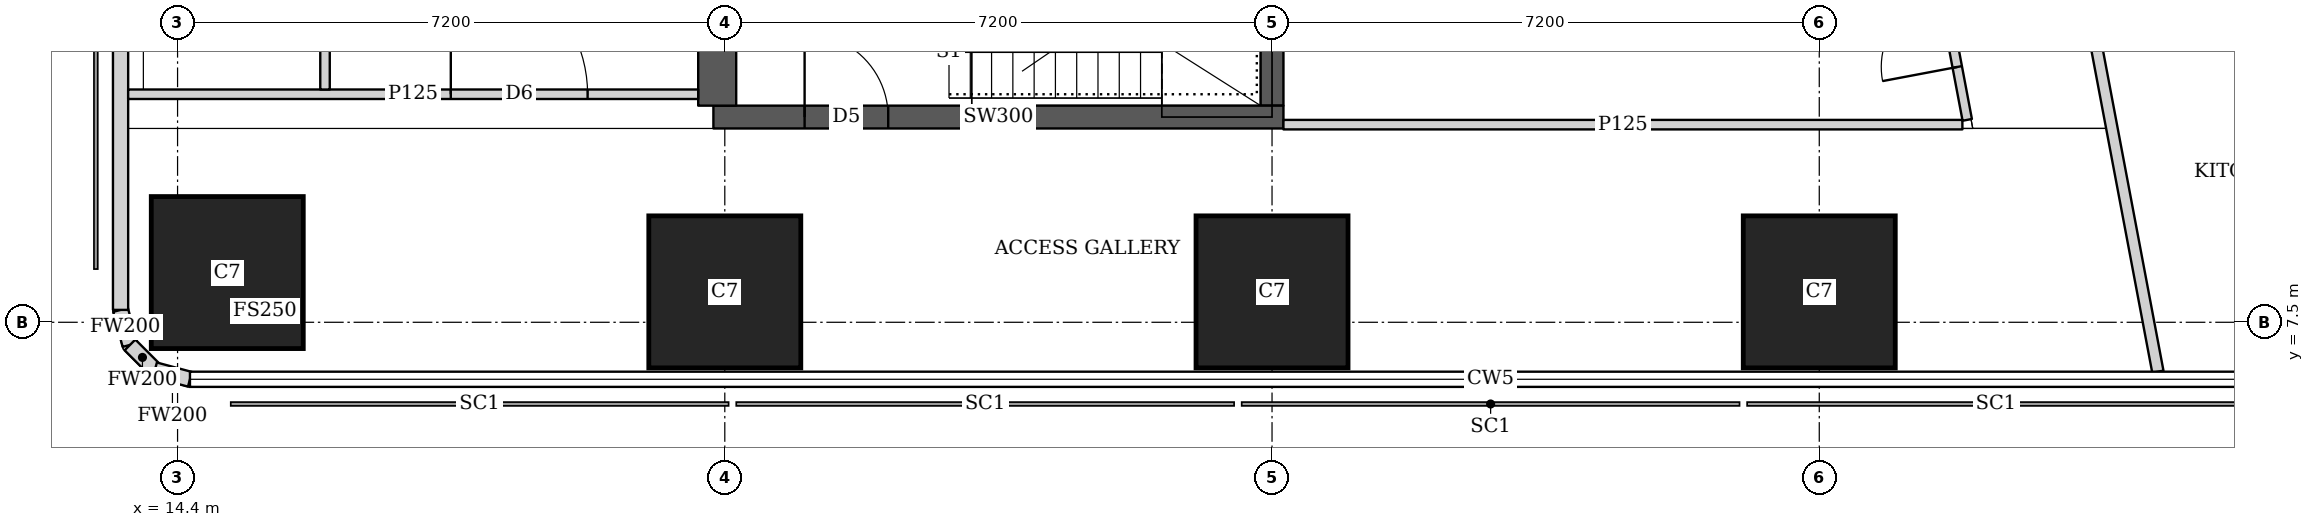
"""IFC4 building model, lengths in metres.
Left out: names, types, materials, properties, quantities, classifications, styles, units other than length and angle.
Written with IfcOpenShell. Run it as: python <this file> out.ifc"""

import sys

from ifc_helpers import new_model, si_unit, direction, frame, frame_2d, origin, origin_2d, place, context, subcontext, project, spatial, rectangle, extrude, element, fill, save


model = new_model("IFC4")
c1 = context("Model", 3, precision=1e-05, world=origin(), true_north=direction((0.0, 1.0)))
c2 = subcontext(c1, "Body", "Model", "MODEL_VIEW")
j1 = project(units=[si_unit("LENGTHUNIT", "METRE"), si_unit("PLANEANGLEUNIT", "RADIAN")], contexts=[c1])
p1 = place(None, origin())
s1 = spatial("IfcSite", under=j1, at=p1, CompositionType="ELEMENT")
p2 = place(p1, origin())
s2 = spatial("IfcBuilding", under=s1, at=p2, CompositionType="ELEMENT")
p3 = place(p2, frame((0.0, 0.0, 255.35)))
s3 = spatial("IfcBuildingStorey", under=s2, at=p3, CompositionType="ELEMENT", Elevation=255.35)
for number, where, z_axis, x_axis in (
    (1, (15.054, 8.154, 0.0), (0.0, 0.0, 1.0), (1.0, 0.0, 0.0)),
    (2, (21.6, 7.9, 0.0), (0.0, 0.0, 1.0), (1.0, 0.0, 0.0)),
    (3, (28.8, 7.9, 0.0), (0.0, 0.0, 1.0), (1.0, 0.0, 0.0)),
    (4, (36.0, 7.9, 0.0), (0.0, 0.0, 1.0), (1.0, 0.0, 0.0)),
):
    element("IfcColumn", number, at=place(p3, frame(where, z_axis=z_axis, x_axis=x_axis)), inside=s3, PredefinedType="COLUMN", context=c2, shape_type="SweptSolid", body=[
        extrude(rectangle(XDim=2.0, YDim=2.0, at=origin_2d()), origin(), (0.0, 0.0, 1.0), 3.75),
    ])
p4 = place(p3, frame((21.45, 10.2, 0.0), z_axis=(0.0, 0.0, 1.0), x_axis=(1.0, 0.0, 0.0)))
e5 = element("IfcWall", 5, at=p4, inside=s3, PredefinedType="SHEAR", context=c2, shape_type="SweptSolid", body=[
    extrude(rectangle(XDim=7.5, YDim=0.3, at=frame_2d((3.75, 0.0))), origin(), (0.0, 0.0, 1.0), 3.75),
])
p5 = place(p4, frame((1.2, 0.0, 0.0)))
e6 = element("IfcOpeningElement", 6, at=p5, cuts=e5, PredefinedType="OPENING", context=c2, shape_type="SweptSolid", body=[
    extrude(rectangle(XDim=1.1, YDim=2.1, at=frame_2d((0.55, 1.05))), frame((0.0, 0.16, 0.0), z_axis=(0.0, -1.0, 0.0), x_axis=(1.0, 0.0, 0.0)), (0.0, 0.0, 1.0), 0.32),
])
p6 = place(p3, frame((21.5, 10.35, 0.0), z_axis=(0.0, 0.0, 1.0), x_axis=(0.0, 1.0, 0.0)))
e7 = element("IfcWall", 7, at=p6, inside=s3, PredefinedType="SHEAR", context=c2, shape_type="SweptSolid", body=[
    extrude(rectangle(XDim=4.2, YDim=0.5, at=frame_2d((2.1, 0.0))), origin(), (0.0, 0.0, 1.0), 3.75),
])
p7 = place(p3, frame((28.8, 10.35, 0.0), z_axis=(0.0, 0.0, 1.0), x_axis=(0.0, 1.0, 0.0)))
e8 = element("IfcWall", 8, at=p7, inside=s3, PredefinedType="SHEAR", context=c2, shape_type="SweptSolid", body=[
    extrude(rectangle(XDim=4.2, YDim=0.3, at=frame_2d((2.1, 0.0))), origin(), (0.0, 0.0, 1.0), 3.75),
])
p8 = place(p3, frame((13.65, 43.037, 0.0), z_axis=(0.0, 0.0, 1.0), x_axis=(0.0, -1.0, 0.0)))
e9 = element("IfcWall", 9, at=p8, inside=s3, PredefinedType="SOLIDWALL", context=c2, shape_type="SweptSolid", body=[
    extrude(rectangle(XDim=35.374, YDim=0.2, at=frame_2d((17.687, 0.0))), origin(), (0.0, 0.0, 1.0), 3.5),
])
p9 = place(p8, frame((1.959, 0.0, 0.9)))
e10 = element("IfcOpeningElement", 10, at=p9, cuts=e9, PredefinedType="OPENING", context=c2, shape_type="SweptSolid", body=[
    extrude(rectangle(XDim=1.8, YDim=1.5, at=frame_2d((0.9, 0.75))), frame((0.0, 0.11, 0.0), z_axis=(0.0, -1.0, 0.0), x_axis=(1.0, 0.0, 0.0)), (0.0, 0.0, 1.0), 0.22),
])
p10 = place(p3, frame((13.65, 7.663, 0.0), z_axis=(0.0, 0.0, 1.0), x_axis=(0.259698463175, -0.965689757751, 0.0)))
e11 = element("IfcWall", 11, at=p10, inside=s3, PredefinedType="SOLIDWALL", context=c2, shape_type="SweptSolid", body=[
    extrude(rectangle(XDim=0.478, YDim=0.2, at=frame_2d((0.239, 0.0))), origin(), (0.0, 0.0, 1.0), 3.5),
])
p11 = place(p3, frame((13.774, 7.202, 0.0), z_axis=(0.0, 0.0, 1.0), x_axis=(0.707369890659, -0.706843573776, 0.0)))
e12 = element("IfcWall", 12, at=p11, inside=s3, PredefinedType="SOLIDWALL", context=c2, shape_type="SweptSolid", body=[
    extrude(rectangle(XDim=0.464, YDim=0.2, at=frame_2d((0.232, 0.0))), origin(), (0.0, 0.0, 1.0), 3.5),
])
p12 = place(p3, frame((14.102, 6.874, 0.0), z_axis=(0.0, 0.0, 1.0), x_axis=(0.965655254015, -0.259826731483, 0.0)))
e13 = element("IfcWall", 13, at=p12, inside=s3, PredefinedType="SOLIDWALL", context=c2, shape_type="SweptSolid", body=[
    extrude(rectangle(XDim=0.477, YDim=0.2, at=frame_2d((0.239, 0.0))), origin(), (0.0, 0.0, 1.0), 3.5),
])
p13 = place(p3, frame((33.781, 42.186, 0.0), z_axis=(0.0, 0.0, 1.0), x_axis=(0.185593518645, -0.9826266055, 0.0)))
e14 = element("IfcWall", 14, at=p13, inside=s3, PredefinedType="SOLIDWALL", context=c2, shape_type="SweptSolid", body=[
    extrude(rectangle(XDim=35.961, YDim=0.15, at=frame_2d((17.98, 0.0))), origin(), (0.0, 0.0, 1.0), 2.5),
])
p14 = place(p13, frame((7.183, 0.0, 0.0)))
e15 = element("IfcOpeningElement", 15, at=p14, cuts=e14, PredefinedType="OPENING", context=c2, shape_type="SweptSolid", body=[
    extrude(rectangle(XDim=1.0, YDim=2.1, at=frame_2d((0.5, 1.05))), frame((0.0, 0.085, 0.0), z_axis=(0.0, -1.0, 0.0), x_axis=(1.0, 0.0, 0.0)), (0.0, 0.0, 1.0), 0.17),
])
p15 = place(p13, frame((11.76, 0.0, 0.0)))
e16 = element("IfcOpeningElement", 16, at=p15, cuts=e14, PredefinedType="OPENING", context=c2, shape_type="SweptSolid", body=[
    extrude(rectangle(XDim=1.0, YDim=2.1, at=frame_2d((0.5, 1.05))), frame((0.0, 0.085, 0.0), z_axis=(0.0, -1.0, 0.0), x_axis=(1.0, 0.0, 0.0)), (0.0, 0.0, 1.0), 0.17),
])
p16 = place(p13, frame((23.863, 0.0, 0.0)))
e17 = element("IfcOpeningElement", 17, at=p16, cuts=e14, PredefinedType="OPENING", context=c2, shape_type="SweptSolid", body=[
    extrude(rectangle(XDim=1.0, YDim=2.1, at=frame_2d((0.5, 1.05))), frame((0.0, 0.085, 0.0), z_axis=(0.0, -1.0, 0.0), x_axis=(1.0, 0.0, 0.0)), (0.0, 0.0, 1.0), 0.17),
])
p17 = place(p13, frame((30.502, 0.0, 0.0)))
e18 = element("IfcOpeningElement", 18, at=p17, cuts=e14, PredefinedType="OPENING", context=c2, shape_type="SweptSolid", body=[
    extrude(rectangle(XDim=1.0, YDim=2.1, at=frame_2d((0.5, 1.05))), frame((0.0, 0.085, 0.0), z_axis=(0.0, -1.0, 0.0), x_axis=(1.0, 0.0, 0.0)), (0.0, 0.0, 1.0), 0.17),
])
p18 = place(p3, frame((13.75, 10.5, 0.0), z_axis=(0.0, 0.0, 1.0), x_axis=(1.0, 0.0, 0.0)))
e19 = element("IfcWall", 19, at=p18, inside=s3, PredefinedType="PARTITIONING", context=c2, shape_type="SweptSolid", body=[
    extrude(rectangle(XDim=7.5, YDim=0.125, at=frame_2d((3.75, 0.0))), origin(), (0.0, 0.0, 1.0), 3.5),
])
p19 = place(p18, frame((4.245, 0.0, 0.0)))
e20 = element("IfcOpeningElement", 20, at=p19, cuts=e19, PredefinedType="OPENING", context=c2, shape_type="SweptSolid", body=[
    extrude(rectangle(XDim=1.8, YDim=2.1, at=frame_2d((0.9, 1.05))), frame((0.0, 0.073, 0.0), z_axis=(0.0, -1.0, 0.0), x_axis=(1.0, 0.0, 0.0)), (0.0, 0.0, 1.0), 0.145),
])
p20 = place(p3, frame((16.34, 10.562, 0.0), z_axis=(0.0, 0.0, 1.0), x_axis=(0.0, 1.0, 0.0)))
e21 = element("IfcWall", 21, at=p20, inside=s3, PredefinedType="PARTITIONING", context=c2, shape_type="SweptSolid", body=[
    extrude(rectangle(XDim=3.988, YDim=0.125, at=frame_2d((1.994, 0.0))), origin(), (0.0, 0.0, 1.0), 3.5),
])
p21 = place(p20, frame((1.438, 0.0, 0.0)))
e22 = element("IfcOpeningElement", 22, at=p21, cuts=e21, PredefinedType="OPENING", context=c2, shape_type="SweptSolid", body=[
    extrude(rectangle(XDim=1.0, YDim=2.1, at=frame_2d((0.5, 1.05))), frame((0.0, 0.073, 0.0), z_axis=(0.0, -1.0, 0.0), x_axis=(1.0, 0.0, 0.0)), (0.0, 0.0, 1.0), 0.145),
])
p22 = place(p3, frame((28.95, 10.1, 0.0), z_axis=(0.0, 0.0, 1.0), x_axis=(1.0, 0.0, 0.0)))
e23 = element("IfcWall", 23, at=p22, inside=s3, PredefinedType="PARTITIONING", context=c2, shape_type="SweptSolid", body=[
    extrude(rectangle(XDim=8.933, YDim=0.125, at=frame_2d((4.467, 0.0))), origin(), (0.0, 0.0, 1.0), 3.5),
])
p23 = place(p3, frame((37.947, 10.163, 0.0), z_axis=(0.0, 0.0, 1.0), x_axis=(-0.185589250699, 0.982627411599, 0.0)))
e24 = element("IfcWall", 24, at=p23, inside=s3, PredefinedType="PARTITIONING", context=c2, shape_type="SweptSolid", body=[
    extrude(rectangle(XDim=12.555, YDim=0.125, at=frame_2d((6.277, 0.0))), origin(), (0.0, 0.0, 1.0), 2.5),
])
p24 = place(p23, frame((0.708, 0.0, 0.0)))
e25 = element("IfcOpeningElement", 25, at=p24, cuts=e24, PredefinedType="OPENING", context=c2, shape_type="SweptSolid", body=[
    extrude(rectangle(XDim=1.0, YDim=2.1, at=frame_2d((0.5, 1.05))), frame((0.0, 0.073, 0.0), z_axis=(0.0, -1.0, 0.0), x_axis=(1.0, 0.0, 0.0)), (0.0, 0.0, 1.0), 0.145),
])
p25 = place(p23, frame((5.9, 0.0, 0.0)))
e26 = element("IfcOpeningElement", 26, at=p25, cuts=e24, PredefinedType="OPENING", context=c2, shape_type="SweptSolid", body=[
    extrude(rectangle(XDim=1.0, YDim=2.1, at=frame_2d((0.5, 1.05))), frame((0.0, 0.073, 0.0), z_axis=(0.0, -1.0, 0.0), x_axis=(1.0, 0.0, 0.0)), (0.0, 0.0, 1.0), 0.145),
])
p26 = place(p23, frame((9.562, 0.0, 0.0)))
e27 = element("IfcOpeningElement", 27, at=p26, cuts=e24, PredefinedType="OPENING", context=c2, shape_type="SweptSolid", body=[
    extrude(rectangle(XDim=1.0, YDim=2.1, at=frame_2d((0.5, 1.05))), frame((0.0, 0.073, 0.0), z_axis=(0.0, -1.0, 0.0), x_axis=(1.0, 0.0, 0.0)), (0.0, 0.0, 1.0), 0.145),
])
p27 = place(p19, origin())
e28 = element("IfcDoor", 28, at=p27, inside=s3, OperationType="DOUBLE_DOOR_SINGLE_SWING", PredefinedType="DOOR", context=c2, shape_type="SweptSolid", body=[
    extrude(rectangle(XDim=1.8, YDim=2.1, at=frame_2d((0.9, 1.05))), frame((0.0, 0.025, 0.0), z_axis=(0.0, -1.0, 0.0), x_axis=(1.0, 0.0, 0.0)), (0.0, 0.0, 1.0), 0.05),
])
fill(e20, e28)
p28 = place(p24, origin())
e29 = element("IfcDoor", 29, at=p28, inside=s3, OperationType="SINGLE_SWING_LEFT", PredefinedType="DOOR", context=c2, shape_type="SweptSolid", body=[
    extrude(rectangle(XDim=1.0, YDim=2.1, at=frame_2d((0.5, 1.05))), frame((0.0, 0.025, 0.0), z_axis=(0.0, -1.0, 0.0), x_axis=(1.0, 0.0, 0.0)), (0.0, 0.0, 1.0), 0.05),
])
fill(e25, e29)
p29 = place(p5, origin())
e30 = element("IfcDoor", 30, at=p29, inside=s3, OperationType="SINGLE_SWING_LEFT", PredefinedType="DOOR", context=c2, shape_type="SweptSolid", body=[
    extrude(rectangle(XDim=1.1, YDim=2.1, at=frame_2d((0.55, 1.05))), frame((0.0, 0.025, 0.0), z_axis=(0.0, -1.0, 0.0), x_axis=(1.0, 0.0, 0.0)), (0.0, 0.0, 1.0), 0.05),
])
fill(e6, e30)
save(model, sys.argv[1])
